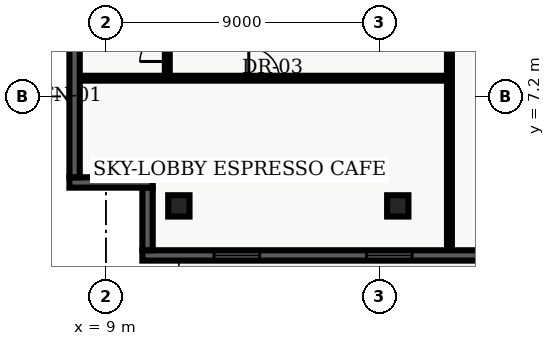
"""IFC4 building model, lengths in metres.
Left out: names, types, materials, properties, quantities, classifications, styles, units other than length and angle.
Written with IfcOpenShell. Run it as: python <this file> out.ifc"""

import sys

from ifc_helpers import new_model, entity, si_unit, converted_unit, direction, frame, origin_with_axes, origin_2d_with_axis, place, context, subcontext, project, spatial, polyline, rectangle, outline, extrude, element, fill, save


model = new_model("IFC4")
c1 = context("Model", 3, precision=1e-05, world=origin_with_axes(), true_north=direction((0.0, 1.0)))
c2 = subcontext(c1, "Body", "Model", "MODEL_VIEW")
j1 = project(units=[si_unit("LENGTHUNIT", "METRE"), converted_unit("PLANEANGLEUNIT", "DEGREE", entity("IfcPlaneAngleMeasure", 0.017), si_unit("PLANEANGLEUNIT", "RADIAN"), dimensions=[0, 0, 0, 0, 0, 0, 0])], contexts=[c1])
p1 = place(None, origin_with_axes())
s1 = spatial("IfcSite", under=j1, at=p1, CompositionType="ELEMENT")
p2 = place(p1, origin_with_axes())
s2 = spatial("IfcBuilding", under=s1, at=p2, CompositionType="ELEMENT")
p3 = place(p2, frame((0.0, 0.0, 303.6), z_axis=(0.0, 0.0, 1.0), x_axis=(1.0, 0.0, 0.0)))
s3 = spatial("IfcBuildingStorey", under=s2, at=p3, CompositionType="ELEMENT", Elevation=303.6)
for number, where, z_axis, x_axis in (
    (1, (11.4, 3.6, 0.0), (0.0, 0.0, 1.0), (1.0, 0.0, 0.0)),
    (2, (18.6, 3.6, 0.0), (0.0, 0.0, 1.0), (1.0, 0.0, 0.0)),
):
    element("IfcColumn", number, at=place(p3, frame(where, z_axis=z_axis, x_axis=x_axis)), inside=s3, PredefinedType="COLUMN", context=c2, shape_type="SweptSolid", body=[
        extrude(rectangle(XDim=0.7, YDim=0.7, at=origin_2d_with_axis()), origin_with_axes(), (0.0, 0.0, 1.0), 5.1),
    ])
p4 = place(p3, frame((8.135, 7.8, 0.0), z_axis=(0.0, 0.0, 1.0), x_axis=(1.0, 0.0, 0.0)))
e3 = element("IfcWall", 3, at=p4, inside=s3, PredefinedType="PARTITIONING", context=c2, shape_type="SweptSolid", body=[
    extrude(outline(polyline([(0.0, -0.08), (12.165, -0.08), (12.165, 0.08), (0.0, 0.08), (0.0, -0.08)])), origin_with_axes(), (0.0, 0.0, 1.0), 3.2),
])
p5 = place(p4, frame((6.065, 0.0, 0.0), z_axis=(0.0, 0.0, 1.0), x_axis=(1.0, 0.0, 0.0)))
e4 = element("IfcOpeningElement", 4, at=p5, cuts=e3, PredefinedType="OPENING", context=c2, shape_type="SweptSolid", body=[
    extrude(rectangle(XDim=1.0, YDim=0.18, at=origin_2d_with_axis()), origin_with_axes(), (0.0, 0.0, 1.0), 2.15),
])
p6 = place(p3, frame((20.3, 2.14, 0.0), z_axis=(0.0, 0.0, 1.0), x_axis=(0.0, 1.0, 0.0)))
e5 = element("IfcWall", 5, at=p6, inside=s3, PredefinedType="PARTITIONING", context=c2, shape_type="SweptSolid", body=[
    extrude(outline(polyline([(0.0, -0.08), (38.36, -0.08), (38.36, 0.08), (0.0, 0.08), (0.0, -0.08)])), origin_with_axes(), (0.0, 0.0, 1.0), 3.2),
])
p7 = place(p6, frame((30.685, 0.0, 0.0), z_axis=(0.0, 0.0, 1.0), x_axis=(1.0, 0.0, 0.0)))
e6 = element("IfcOpeningElement", 6, at=p7, cuts=e5, PredefinedType="OPENING", context=c2, shape_type="SweptSolid", body=[
    extrude(rectangle(XDim=1.05, YDim=0.18, at=origin_2d_with_axis()), origin_with_axes(), (0.0, 0.0, 1.0), 2.15),
])
p8 = place(p6, frame((13.275, 0.0, 0.0), z_axis=(0.0, 0.0, 1.0), x_axis=(1.0, 0.0, 0.0)))
e7 = element("IfcOpeningElement", 7, at=p8, cuts=e5, PredefinedType="OPENING", context=c2, shape_type="SweptSolid", body=[
    extrude(rectangle(XDim=1.0, YDim=0.18, at=origin_2d_with_axis()), origin_with_axes(), (0.0, 0.0, 1.0), 2.15),
])
p9 = place(p3, frame((11.02, 7.8, 0.0), z_axis=(0.0, 0.0, 1.0), x_axis=(0.0, 1.0, 0.0)))
e8 = element("IfcWall", 8, at=p9, inside=s3, PredefinedType="PARTITIONING", context=c2, shape_type="SweptSolid", body=[
    extrude(outline(polyline([(0.0, -0.08), (2.85, -0.08), (2.85, 0.08), (0.0, 0.08), (0.0, -0.08)])), origin_with_axes(), (0.0, 0.0, 1.0), 3.2),
])
p10 = place(p9, frame((1.0, 0.0, 0.0), z_axis=(0.0, 0.0, 1.0), x_axis=(1.0, 0.0, 0.0)))
e9 = element("IfcOpeningElement", 9, at=p10, cuts=e8, PredefinedType="OPENING", context=c2, shape_type="SweptSolid", body=[
    extrude(rectangle(XDim=0.9, YDim=0.18, at=origin_2d_with_axis()), origin_with_axes(), (0.0, 0.0, 1.0), 2.15),
])
p11 = place(p3, frame((31.46, 1.97, 0.0), z_axis=(0.0, 0.0, 1.0), x_axis=(-1.0, 0.0, 0.0)))
e10 = element("IfcWall", 10, at=p11, inside=s3, PredefinedType="SOLIDWALL", context=c2, shape_type="SweptSolid", body=[
    extrude(outline(polyline([(0.0, -0.17), (21.26, -0.17), (21.26, 0.17), (0.0, 0.17), (0.0, -0.17)])), origin_with_axes(), (0.0, 0.0, 1.0), 4.84),
])
p12 = place(p11, frame((8.96, 0.0, 0.0), z_axis=(0.0, 0.0, 1.0), x_axis=(1.0, 0.0, 0.0)))
e11 = element("IfcOpeningElement", 11, at=p12, cuts=e10, PredefinedType="OPENING", context=c2, shape_type="SweptSolid", body=[
    extrude(rectangle(XDim=1.6, YDim=0.36, at=origin_2d_with_axis()), origin_with_axes(), (0.0, 0.0, 1.0), 2.2),
])
p13 = place(p11, frame((3.108, 0.0, 0.45), z_axis=(0.0, 0.0, 1.0), x_axis=(1.0, 0.0, 0.0)))
e12 = element("IfcOpeningElement", 12, at=p13, cuts=e10, PredefinedType="OPENING", context=c2, shape_type="SweptSolid", body=[
    extrude(rectangle(XDim=1.5, YDim=0.36, at=origin_2d_with_axis()), origin_with_axes(), (0.0, 0.0, 1.0), 2.1),
])
p14 = place(p11, frame((13.138, 0.0, 0.45), z_axis=(0.0, 0.0, 1.0), x_axis=(1.0, 0.0, 0.0)))
e13 = element("IfcOpeningElement", 13, at=p14, cuts=e10, PredefinedType="OPENING", context=c2, shape_type="SweptSolid", body=[
    extrude(rectangle(XDim=1.5, YDim=0.36, at=origin_2d_with_axis()), origin_with_axes(), (0.0, 0.0, 1.0), 2.1),
])
p15 = place(p11, frame((18.153, 0.0, 0.45), z_axis=(0.0, 0.0, 1.0), x_axis=(1.0, 0.0, 0.0)))
e14 = element("IfcOpeningElement", 14, at=p15, cuts=e10, PredefinedType="OPENING", context=c2, shape_type="SweptSolid", body=[
    extrude(rectangle(XDim=1.5, YDim=0.36, at=origin_2d_with_axis()), origin_with_axes(), (0.0, 0.0, 1.0), 2.1),
])
p16 = place(p3, frame((10.37, 2.14, 0.0), z_axis=(0.0, 0.0, 1.0), x_axis=(0.0, 1.0, 0.0)))
e15 = element("IfcWall", 15, at=p16, inside=s3, PredefinedType="SOLIDWALL", context=c2, shape_type="SweptSolid", body=[
    extrude(outline(polyline([(0.0, -0.17), (2.06, -0.17), (2.06, 0.17), (0.0, 0.17), (0.0, -0.17)])), origin_with_axes(), (0.0, 0.0, 1.0), 4.84),
])
p17 = place(p3, frame((10.54, 4.37, 0.0), z_axis=(0.0, 0.0, 1.0), x_axis=(-1.0, 0.0, 0.0)))
e16 = element("IfcWall", 16, at=p17, inside=s3, PredefinedType="SOLIDWALL", context=c2, shape_type="SweptSolid", body=[
    extrude(outline(polyline([(0.0, -0.17), (2.74, -0.17), (2.74, 0.17), (0.0, 0.17), (0.0, -0.17)])), origin_with_axes(), (0.0, 0.0, 1.0), 4.84),
])
p18 = place(p3, frame((7.97, 4.54, 0.0), z_axis=(0.0, 0.0, 1.0), x_axis=(0.0, 1.0, 0.0)))
e17 = element("IfcWall", 17, at=p18, inside=s3, PredefinedType="SOLIDWALL", context=c2, shape_type="SweptSolid", body=[
    extrude(outline(polyline([(0.0, -0.17), (39.86, -0.17), (39.86, 0.17), (0.0, 0.17), (0.0, -0.17)])), origin_with_axes(), (0.0, 0.0, 1.0), 4.84),
])
p19 = place(p18, frame((7.849, 0.0, 0.45), z_axis=(0.0, 0.0, 1.0), x_axis=(1.0, 0.0, 0.0)))
e18 = element("IfcOpeningElement", 18, at=p19, cuts=e17, PredefinedType="OPENING", context=c2, shape_type="SweptSolid", body=[
    extrude(rectangle(XDim=1.5, YDim=0.36, at=origin_2d_with_axis()), origin_with_axes(), (0.0, 0.0, 1.0), 2.1),
])
p20 = place(p18, frame((12.681, 0.0, 0.45), z_axis=(0.0, 0.0, 1.0), x_axis=(1.0, 0.0, 0.0)))
e19 = element("IfcOpeningElement", 19, at=p20, cuts=e17, PredefinedType="OPENING", context=c2, shape_type="SweptSolid", body=[
    extrude(rectangle(XDim=1.5, YDim=0.36, at=origin_2d_with_axis()), origin_with_axes(), (0.0, 0.0, 1.0), 2.1),
])
p21 = place(p18, frame((17.514, 0.0, 0.45), z_axis=(0.0, 0.0, 1.0), x_axis=(1.0, 0.0, 0.0)))
e20 = element("IfcOpeningElement", 20, at=p21, cuts=e17, PredefinedType="OPENING", context=c2, shape_type="SweptSolid", body=[
    extrude(rectangle(XDim=1.5, YDim=0.36, at=origin_2d_with_axis()), origin_with_axes(), (0.0, 0.0, 1.0), 2.1),
])
p22 = place(p18, frame((22.346, 0.0, 0.45), z_axis=(0.0, 0.0, 1.0), x_axis=(1.0, 0.0, 0.0)))
e21 = element("IfcOpeningElement", 21, at=p22, cuts=e17, PredefinedType="OPENING", context=c2, shape_type="SweptSolid", body=[
    extrude(rectangle(XDim=1.5, YDim=0.36, at=origin_2d_with_axis()), origin_with_axes(), (0.0, 0.0, 1.0), 2.1),
])
p23 = place(p18, frame((26.729, 0.0, 0.45), z_axis=(0.0, 0.0, 1.0), x_axis=(1.0, 0.0, 0.0)))
e22 = element("IfcOpeningElement", 22, at=p23, cuts=e17, PredefinedType="OPENING", context=c2, shape_type="SweptSolid", body=[
    extrude(rectangle(XDim=1.5, YDim=0.36, at=origin_2d_with_axis()), origin_with_axes(), (0.0, 0.0, 1.0), 2.1),
])
p24 = place(p18, frame((32.011, 0.0, 0.45), z_axis=(0.0, 0.0, 1.0), x_axis=(1.0, 0.0, 0.0)))
e23 = element("IfcOpeningElement", 23, at=p24, cuts=e17, PredefinedType="OPENING", context=c2, shape_type="SweptSolid", body=[
    extrude(rectangle(XDim=1.5, YDim=0.36, at=origin_2d_with_axis()), origin_with_axes(), (0.0, 0.0, 1.0), 2.1),
])
p25 = place(p18, frame((37.294, 0.0, 0.45), z_axis=(0.0, 0.0, 1.0), x_axis=(1.0, 0.0, 0.0)))
e24 = element("IfcOpeningElement", 24, at=p25, cuts=e17, PredefinedType="OPENING", context=c2, shape_type="SweptSolid", body=[
    extrude(rectangle(XDim=1.5, YDim=0.36, at=origin_2d_with_axis()), origin_with_axes(), (0.0, 0.0, 1.0), 2.1),
])
p26 = place(p9, frame((1.0, 0.0, 0.0), z_axis=(0.0, 0.0, 1.0), x_axis=(1.0, 0.0, 0.0)))
e25 = element("IfcDoor", 25, at=p26, inside=s3, OperationType="SINGLE_SWING_LEFT", PredefinedType="DOOR", context=c2, shape_type="SweptSolid", body=[
    extrude(rectangle(XDim=0.9, YDim=0.09, at=origin_2d_with_axis()), origin_with_axes(), (0.0, 0.0, 1.0), 2.15),
])
fill(e9, e25)
p27 = place(p4, frame((6.065, 0.0, 0.0), z_axis=(0.0, 0.0, 1.0), x_axis=(1.0, 0.0, 0.0)))
e26 = element("IfcDoor", 26, at=p27, inside=s3, OperationType="SINGLE_SWING_LEFT", PredefinedType="DOOR", context=c2, shape_type="SweptSolid", body=[
    extrude(rectangle(XDim=1.0, YDim=0.09, at=origin_2d_with_axis()), origin_with_axes(), (0.0, 0.0, 1.0), 2.15),
])
fill(e4, e26)
p28 = place(p11, frame((13.138, 0.0, 0.45), z_axis=(0.0, 0.0, 1.0), x_axis=(1.0, 0.0, 0.0)))
e27 = element("IfcWindow", 27, at=p28, inside=s3, PredefinedType="WINDOW", context=c2, shape_type="SweptSolid", body=[
    extrude(rectangle(XDim=1.5, YDim=0.09, at=origin_2d_with_axis()), origin_with_axes(), (0.0, 0.0, 1.0), 2.1),
])
fill(e13, e27)
p29 = place(p11, frame((18.153, 0.0, 0.45), z_axis=(0.0, 0.0, 1.0), x_axis=(1.0, 0.0, 0.0)))
e28 = element("IfcWindow", 28, at=p29, inside=s3, PredefinedType="WINDOW", context=c2, shape_type="SweptSolid", body=[
    extrude(rectangle(XDim=1.5, YDim=0.09, at=origin_2d_with_axis()), origin_with_axes(), (0.0, 0.0, 1.0), 2.1),
])
fill(e14, e28)
save(model, sys.argv[1])
